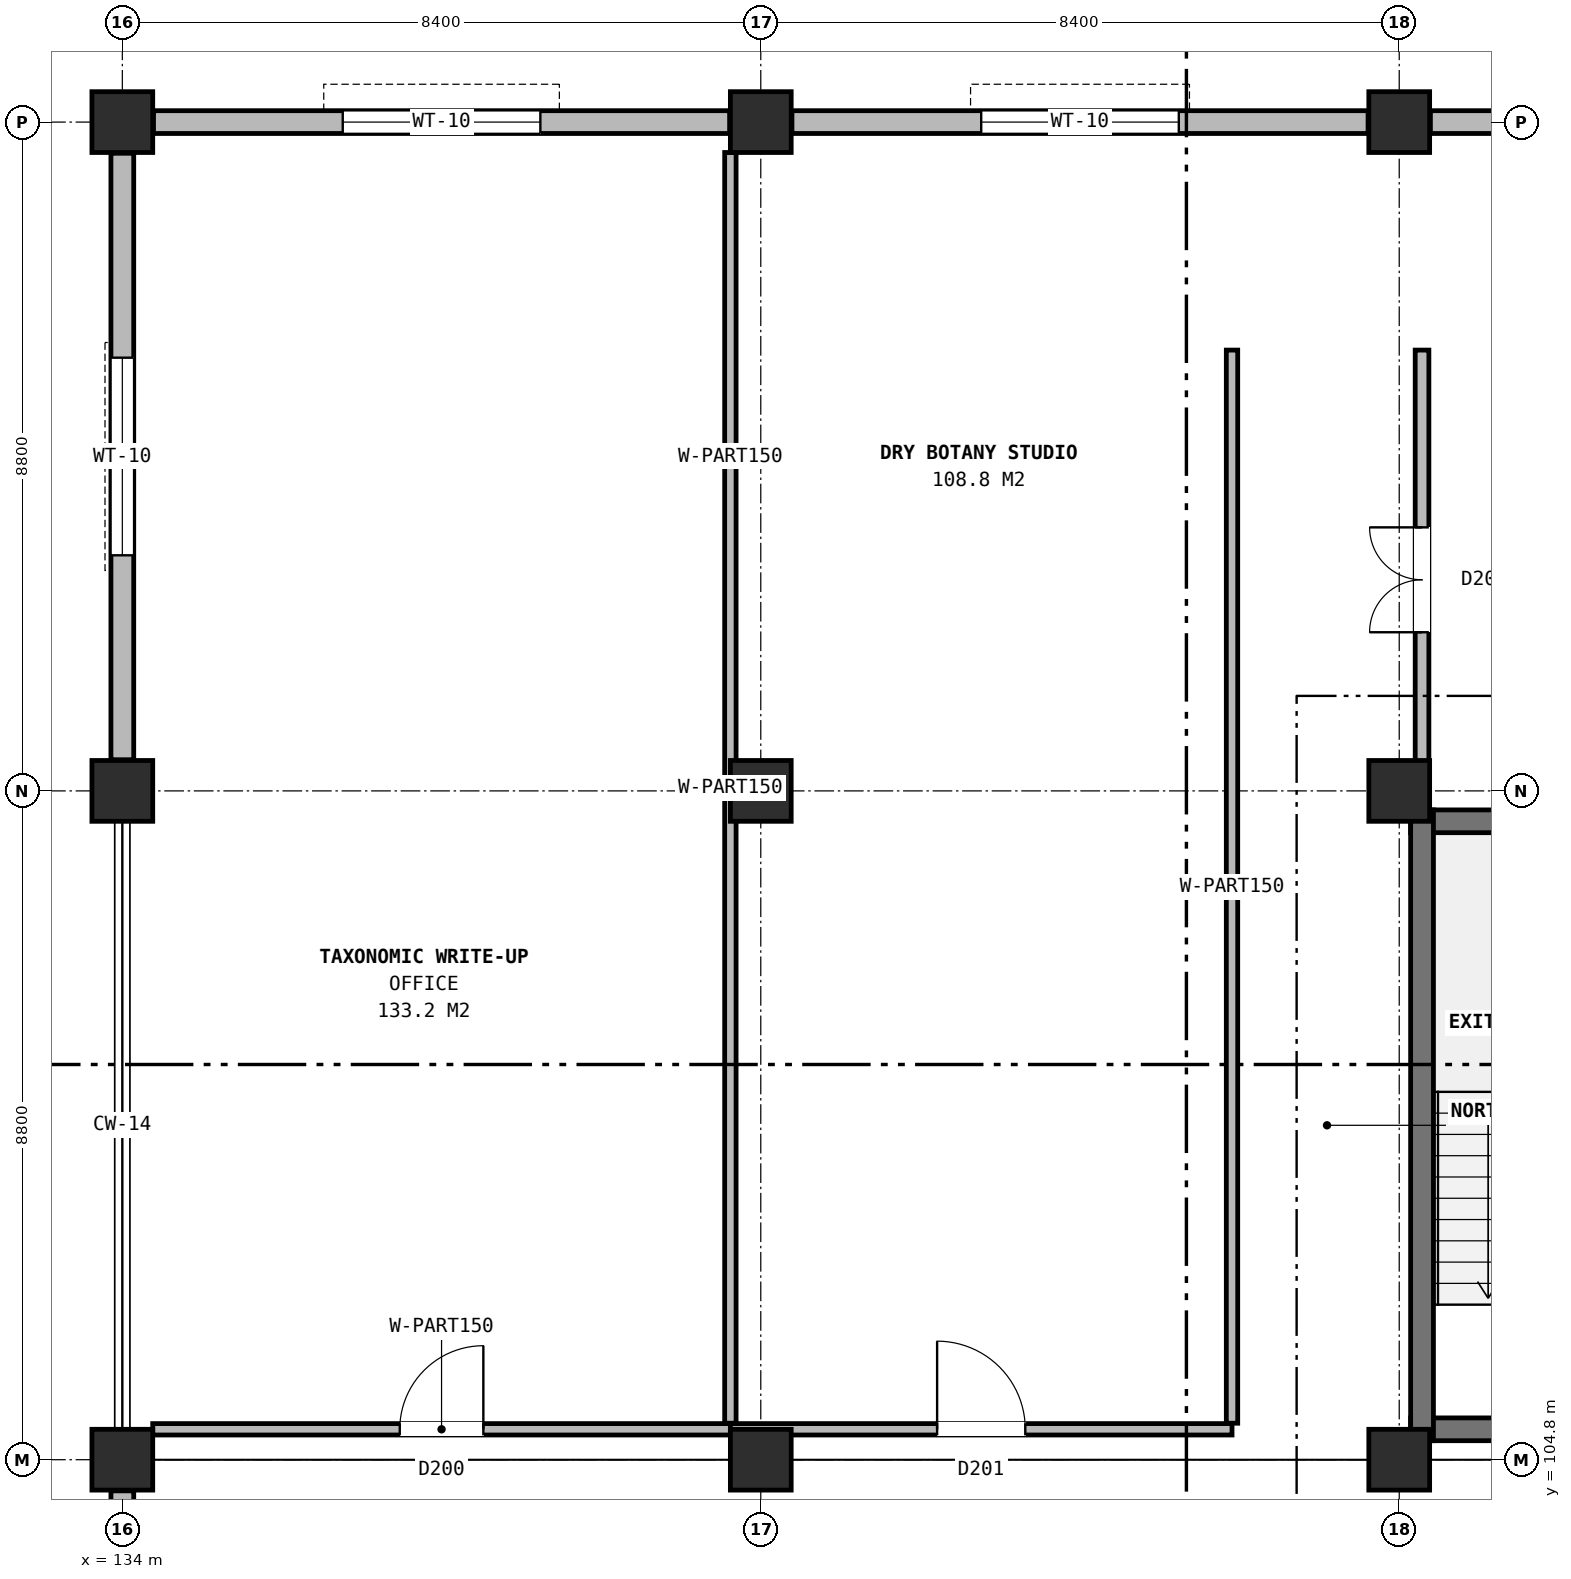
"""IFC4 building model, lengths in metres.
Left out: names, types, materials, properties, quantities, classifications, styles, units other than length and angle.
Written with IfcOpenShell. Run it as: python <this file> out.ifc"""

import sys

from ifc_helpers import new_model, si_unit, direction, frame, frame_2d, origin, origin_2d, place, context, subcontext, project, spatial, rectangle, extrude, element, fill, save


model = new_model("IFC4")
c1 = context("Model", 3, precision=1e-05, world=origin(), true_north=direction((0.0, 1.0)))
c2 = subcontext(c1, "Body", "Model", "MODEL_VIEW")
j1 = project(units=[si_unit("LENGTHUNIT", "METRE"), si_unit("PLANEANGLEUNIT", "RADIAN")], contexts=[c1])
p1 = place(None, origin())
s1 = spatial("IfcSite", under=j1, at=p1, CompositionType="ELEMENT")
p2 = place(p1, origin())
s2 = spatial("IfcBuilding", under=s1, at=p2, CompositionType="ELEMENT")
p3 = place(p2, frame((0.0, 0.0, 17.2)))
s3 = spatial("IfcBuildingStorey", under=s2, at=p3, CompositionType="ELEMENT", Elevation=17.2)
for number, where, z_axis, x_axis in (
    (1, (134.0, 104.8, 0.0), (0.0, 0.0, 1.0), (1.0, 0.0, 0.0)),
    (2, (134.0, 113.6, 0.0), (0.0, 0.0, 1.0), (1.0, 0.0, 0.0)),
    (3, (134.0, 122.4, 0.0), (0.0, 0.0, 1.0), (1.0, 0.0, 0.0)),
    (4, (142.4, 104.8, 0.0), (0.0, 0.0, 1.0), (1.0, 0.0, 0.0)),
    (5, (142.4, 113.6, 0.0), (0.0, 0.0, 1.0), (1.0, 0.0, 0.0)),
    (6, (142.4, 122.4, 0.0), (0.0, 0.0, 1.0), (1.0, 0.0, 0.0)),
    (7, (150.8, 104.8, 0.0), (0.0, 0.0, 1.0), (1.0, 0.0, 0.0)),
    (8, (150.8, 113.6, 0.0), (0.0, 0.0, 1.0), (1.0, 0.0, 0.0)),
    (9, (150.8, 122.4, 0.0), (0.0, 0.0, 1.0), (1.0, 0.0, 0.0)),
):
    element("IfcColumn", number, at=place(p3, frame(where, z_axis=z_axis, x_axis=x_axis)), inside=s3, PredefinedType="COLUMN", context=c2, shape_type="SweptSolid", body=[
        extrude(rectangle(XDim=0.8, YDim=0.8, at=origin_2d()), origin(), (0.0, 0.0, 1.0), 3.8),
    ])
p4 = place(p3, frame((158.79, 122.4, 0.0), z_axis=(0.0, 0.0, 1.0), x_axis=(-1.0, 0.0, 0.0)))
e10 = element("IfcWall", 10, at=p4, inside=s3, PredefinedType="SOLIDWALL", context=c2, shape_type="SweptSolid", body=[
    extrude(rectangle(XDim=7.58, YDim=0.3, at=frame_2d((3.79, 0.0))), origin(), (0.0, 0.0, 1.0), 3.05),
])
p5 = place(p4, frame((2.49, 0.0, 0.9)))
e11 = element("IfcOpeningElement", 11, at=p5, cuts=e10, PredefinedType="OPENING", context=c2, shape_type="SweptSolid", body=[
    extrude(rectangle(XDim=2.6, YDim=2.0, at=frame_2d((1.3, 1.0))), frame((0.0, 0.16, 0.0), z_axis=(0.0, -1.0, 0.0), x_axis=(1.0, 0.0, 0.0)), (0.0, 0.0, 1.0), 0.32),
])
p6 = place(p3, frame((150.39, 122.4, 0.0), z_axis=(0.0, 0.0, 1.0), x_axis=(-1.0, 0.0, 0.0)))
e12 = element("IfcWall", 12, at=p6, inside=s3, PredefinedType="SOLIDWALL", context=c2, shape_type="SweptSolid", body=[
    extrude(rectangle(XDim=7.58, YDim=0.3, at=frame_2d((3.79, 0.0))), origin(), (0.0, 0.0, 1.0), 3.05),
])
p7 = place(p6, frame((2.49, 0.0, 0.9)))
e13 = element("IfcOpeningElement", 13, at=p7, cuts=e12, PredefinedType="OPENING", context=c2, shape_type="SweptSolid", body=[
    extrude(rectangle(XDim=2.6, YDim=2.0, at=frame_2d((1.3, 1.0))), frame((0.0, 0.16, 0.0), z_axis=(0.0, -1.0, 0.0), x_axis=(1.0, 0.0, 0.0)), (0.0, 0.0, 1.0), 0.32),
])
p8 = place(p3, frame((141.99, 122.4, 0.0), z_axis=(0.0, 0.0, 1.0), x_axis=(-1.0, 0.0, 0.0)))
e14 = element("IfcWall", 14, at=p8, inside=s3, PredefinedType="SOLIDWALL", context=c2, shape_type="SweptSolid", body=[
    extrude(rectangle(XDim=7.58, YDim=0.3, at=frame_2d((3.79, 0.0))), origin(), (0.0, 0.0, 1.0), 3.05),
])
p9 = place(p8, frame((2.49, 0.0, 0.9)))
e15 = element("IfcOpeningElement", 15, at=p9, cuts=e14, PredefinedType="OPENING", context=c2, shape_type="SweptSolid", body=[
    extrude(rectangle(XDim=2.6, YDim=2.0, at=frame_2d((1.3, 1.0))), frame((0.0, 0.16, 0.0), z_axis=(0.0, -1.0, 0.0), x_axis=(1.0, 0.0, 0.0)), (0.0, 0.0, 1.0), 0.32),
])
p10 = place(p3, frame((134.0, 121.99, 0.0), z_axis=(0.0, 0.0, 1.0), x_axis=(0.0, -1.0, 0.0)))
e16 = element("IfcWall", 16, at=p10, inside=s3, PredefinedType="SOLIDWALL", context=c2, shape_type="SweptSolid", body=[
    extrude(rectangle(XDim=7.98, YDim=0.3, at=frame_2d((3.99, 0.0))), origin(), (0.0, 0.0, 1.0), 3.05),
])
p11 = place(p10, frame((2.69, 0.0, 0.9)))
e17 = element("IfcOpeningElement", 17, at=p11, cuts=e16, PredefinedType="OPENING", context=c2, shape_type="SweptSolid", body=[
    extrude(rectangle(XDim=2.6, YDim=2.0, at=frame_2d((1.3, 1.0))), frame((0.0, 0.16, 0.0), z_axis=(0.0, -1.0, 0.0), x_axis=(1.0, 0.0, 0.0)), (0.0, 0.0, 1.0), 0.32),
])
p12 = place(p3, frame((134.0, 104.39, 0.0), z_axis=(0.0, 0.0, 1.0), x_axis=(0.0, -1.0, 0.0)))
e18 = element("IfcWall", 18, at=p12, inside=s3, PredefinedType="SOLIDWALL", context=c2, shape_type="SweptSolid", body=[
    extrude(rectangle(XDim=7.98, YDim=0.3, at=frame_2d((3.99, 0.0))), origin(), (0.0, 0.0, 1.0), 3.05),
])
p13 = place(p12, frame((3.685, 0.0, 0.9)))
e19 = element("IfcOpeningElement", 19, at=p13, cuts=e18, PredefinedType="OPENING", context=c2, shape_type="SweptSolid", body=[
    extrude(rectangle(XDim=2.6, YDim=2.0, at=frame_2d((1.3, 1.0))), frame((0.0, 0.16, 0.0), z_axis=(0.0, -1.0, 0.0), x_axis=(1.0, 0.0, 0.0)), (0.0, 0.0, 1.0), 0.32),
])
for number, where, z_axis, x_axis in (
    (20, (150.95, 105.2, 0.0), (0.0, 0.0, 1.0), (1.0, 0.0, 0.0)),
    (21, (150.95, 113.2, 0.0), (0.0, 0.0, 1.0), (1.0, 0.0, 0.0)),
):
    element("IfcWall", number, at=place(p3, frame(where, z_axis=z_axis, x_axis=x_axis)), inside=s3, PredefinedType="SHEAR", context=c2, shape_type="SweptSolid", body=[
        extrude(rectangle(XDim=3.6, YDim=0.3, at=frame_2d((1.8, 0.0))), origin(), (0.0, 0.0, 1.0), 3.8),
    ])
p14 = place(p3, frame((151.1, 105.05, 0.0), z_axis=(0.0, 0.0, 1.0), x_axis=(0.0, 1.0, 0.0)))
e22 = element("IfcWall", 22, at=p14, inside=s3, PredefinedType="SHEAR", context=c2, shape_type="SweptSolid", body=[
    extrude(rectangle(XDim=8.3, YDim=0.3, at=frame_2d((4.15, 0.0))), origin(), (0.0, 0.0, 1.0), 3.8),
])
p15 = place(p3, frame((134.4, 105.2, 0.0), z_axis=(0.0, 0.0, 1.0), x_axis=(1.0, 0.0, 0.0)))
e23 = element("IfcWall", 23, at=p15, inside=s3, PredefinedType="PARTITIONING", context=c2, shape_type="SweptSolid", body=[
    extrude(rectangle(XDim=7.6, YDim=0.15, at=frame_2d((3.8, 0.0))), origin(), (0.0, 0.0, 1.0), 3.045),
])
p16 = place(p15, frame((3.25, 0.0, 0.0)))
e24 = element("IfcOpeningElement", 24, at=p16, cuts=e23, PredefinedType="OPENING", context=c2, shape_type="SweptSolid", body=[
    extrude(rectangle(XDim=1.1, YDim=2.15, at=frame_2d((0.55, 1.075))), frame((0.0, 0.085, 0.0), z_axis=(0.0, -1.0, 0.0), x_axis=(1.0, 0.0, 0.0)), (0.0, 0.0, 1.0), 0.17),
])
p17 = place(p3, frame((142.0, 105.2, 0.0), z_axis=(0.0, 0.0, 1.0), x_axis=(1.0, 0.0, 0.0)))
e25 = element("IfcWall", 25, at=p17, inside=s3, PredefinedType="PARTITIONING", context=c2, shape_type="SweptSolid", body=[
    extrude(rectangle(XDim=6.6, YDim=0.15, at=frame_2d((3.3, 0.0))), origin(), (0.0, 0.0, 1.0), 3.045),
])
p18 = place(p17, frame((2.72, 0.0, 0.0)))
e26 = element("IfcOpeningElement", 26, at=p18, cuts=e25, PredefinedType="OPENING", context=c2, shape_type="SweptSolid", body=[
    extrude(rectangle(XDim=1.16, YDim=2.2, at=frame_2d((0.58, 1.1))), frame((0.0, 0.085, 0.0), z_axis=(0.0, -1.0, 0.0), x_axis=(1.0, 0.0, 0.0)), (0.0, 0.0, 1.0), 0.17),
])
p19 = place(p3, frame((148.6, 105.28, 0.0), z_axis=(0.0, 0.0, 1.0), x_axis=(0.0, 1.0, 0.0)))
e27 = element("IfcWall", 27, at=p19, inside=s3, PredefinedType="PARTITIONING", context=c2, shape_type="SweptSolid", body=[
    extrude(rectangle(XDim=14.12, YDim=0.15, at=frame_2d((7.06, 0.0))), origin(), (0.0, 0.0, 1.0), 3.465),
])
p20 = place(p3, frame((151.1, 113.355, 0.0), z_axis=(0.0, 0.0, 1.0), x_axis=(0.0, 1.0, 0.0)))
e28 = element("IfcWall", 28, at=p20, inside=s3, PredefinedType="PARTITIONING", context=c2, shape_type="SweptSolid", body=[
    extrude(rectangle(XDim=6.045, YDim=0.18, at=frame_2d((3.022, 0.0))), origin(), (0.0, 0.0, 1.0), 3.045),
])
p21 = place(p20, frame((2.333, 0.0, 0.0)))
e29 = element("IfcOpeningElement", 29, at=p21, cuts=e28, PredefinedType="OPENING", context=c2, shape_type="SweptSolid", body=[
    extrude(rectangle(XDim=1.38, YDim=2.2, at=frame_2d((0.69, 1.1))), frame((0.0, 0.1, 0.0), z_axis=(0.0, -1.0, 0.0), x_axis=(1.0, 0.0, 0.0)), (0.0, 0.0, 1.0), 0.2),
])
p22 = place(p3, frame((142.0, 105.28, 0.0), z_axis=(0.0, 0.0, 1.0), x_axis=(0.0, 1.0, 0.0)))
e30 = element("IfcWall", 30, at=p22, inside=s3, PredefinedType="PARTITIONING", context=c2, shape_type="SweptSolid", body=[
    extrude(rectangle(XDim=16.72, YDim=0.15, at=frame_2d((8.36, 0.0))), origin(), (0.0, 0.0, 1.0), 3.045),
])
p23 = place(p7, origin())
e31 = element("IfcWindow", 31, at=p23, inside=s3, PartitioningType="SINGLE_PANEL", PredefinedType="WINDOW", context=c2, shape_type="SweptSolid", body=[
    extrude(rectangle(XDim=2.6, YDim=2.0, at=frame_2d((1.3, 1.0))), frame((0.0, 0.03, 0.0), z_axis=(0.0, -1.0, 0.0), x_axis=(1.0, 0.0, 0.0)), (0.0, 0.0, 1.0), 0.06),
])
fill(e13, e31)
p24 = place(p9, origin())
e32 = element("IfcWindow", 32, at=p24, inside=s3, PartitioningType="SINGLE_PANEL", PredefinedType="WINDOW", context=c2, shape_type="SweptSolid", body=[
    extrude(rectangle(XDim=2.6, YDim=2.0, at=frame_2d((1.3, 1.0))), frame((0.0, 0.03, 0.0), z_axis=(0.0, -1.0, 0.0), x_axis=(1.0, 0.0, 0.0)), (0.0, 0.0, 1.0), 0.06),
])
fill(e15, e32)
p25 = place(p11, origin())
e33 = element("IfcWindow", 33, at=p25, inside=s3, PartitioningType="SINGLE_PANEL", PredefinedType="WINDOW", context=c2, shape_type="SweptSolid", body=[
    extrude(rectangle(XDim=2.6, YDim=2.0, at=frame_2d((1.3, 1.0))), frame((0.0, 0.03, 0.0), z_axis=(0.0, -1.0, 0.0), x_axis=(1.0, 0.0, 0.0)), (0.0, 0.0, 1.0), 0.06),
])
fill(e17, e33)
p26 = place(p16, origin())
e34 = element("IfcDoor", 34, at=p26, inside=s3, OperationType="SINGLE_SWING_RIGHT", PredefinedType="DOOR", context=c2, shape_type="SweptSolid", body=[
    extrude(rectangle(XDim=1.1, YDim=2.15, at=frame_2d((0.55, 1.075))), frame((0.0, 0.025, 0.0), z_axis=(0.0, -1.0, 0.0), x_axis=(1.0, 0.0, 0.0)), (0.0, 0.0, 1.0), 0.05),
])
fill(e24, e34)
p27 = place(p18, origin())
e35 = element("IfcDoor", 35, at=p27, inside=s3, OperationType="SINGLE_SWING_LEFT", PredefinedType="DOOR", context=c2, shape_type="SweptSolid", body=[
    extrude(rectangle(XDim=1.16, YDim=2.2, at=frame_2d((0.58, 1.1))), frame((0.0, 0.025, 0.0), z_axis=(0.0, -1.0, 0.0), x_axis=(1.0, 0.0, 0.0)), (0.0, 0.0, 1.0), 0.05),
])
fill(e26, e35)
p28 = place(p21, origin())
e36 = element("IfcDoor", 36, at=p28, inside=s3, OperationType="DOUBLE_DOOR_SINGLE_SWING", PredefinedType="DOOR", context=c2, shape_type="SweptSolid", body=[
    extrude(rectangle(XDim=1.38, YDim=2.2, at=frame_2d((0.69, 1.1))), frame((0.0, 0.025, 0.0), z_axis=(0.0, -1.0, 0.0), x_axis=(1.0, 0.0, 0.0)), (0.0, 0.0, 1.0), 0.05),
])
fill(e29, e36)
save(model, sys.argv[1])
